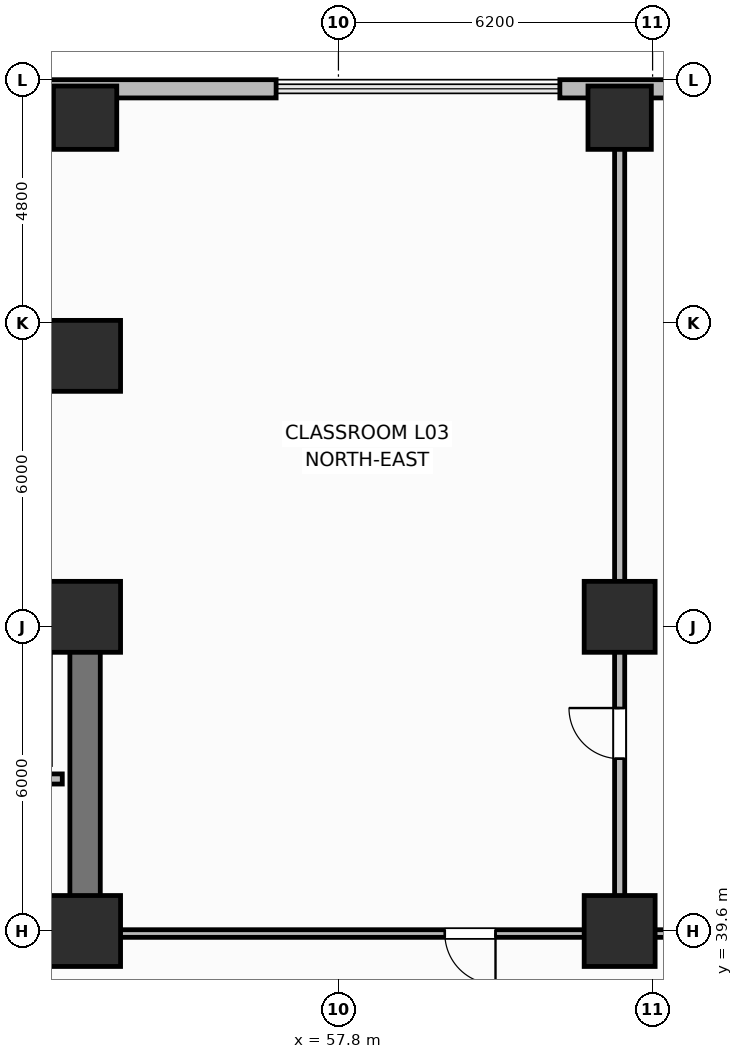
"""IFC4 building model, lengths in metres.
Left out: names, types, materials, properties, quantities, classifications, styles, units other than length and angle.
Written with IfcOpenShell. Run it as: python <this file> out.ifc"""

import sys

from ifc_helpers import new_model, si_unit, direction, frame, frame_2d, origin, origin_2d, place, context, subcontext, project, spatial, rectangle, extrude, element, fill, save


model = new_model("IFC4")
c1 = context("Model", 3, precision=1e-05, world=origin(), true_north=direction((0.0, 1.0)))
c2 = subcontext(c1, "Body", "Model", "MODEL_VIEW")
j1 = project(units=[si_unit("LENGTHUNIT", "METRE"), si_unit("PLANEANGLEUNIT", "RADIAN")], contexts=[c1])
p1 = place(None, origin())
s1 = spatial("IfcSite", under=j1, at=p1, CompositionType="ELEMENT")
p2 = place(p1, origin())
s2 = spatial("IfcBuilding", under=s1, at=p2, CompositionType="ELEMENT")
p3 = place(p2, frame((0.0, 0.0, 15.6)))
s3 = spatial("IfcBuildingStorey", under=s2, at=p3, CompositionType="ELEMENT", Elevation=15.6)
p4 = place(p3, frame((25.6, 45.8, 0.0), z_axis=(0.0, 0.0, 1.0), x_axis=(1.0, 0.0, 0.0)))
e1 = element("IfcWall", 1, at=p4, inside=s3, PredefinedType="SHEAR", context=c2, shape_type="SweptSolid", body=[
    extrude(rectangle(XDim=27.2, YDim=0.6, at=frame_2d((13.6, 0.0))), origin(), (0.0, 0.0, 1.0), 4.5),
])
p5 = place(p3, frame((52.8, 39.9, 0.0), z_axis=(0.0, 0.0, 1.0), x_axis=(0.0, 1.0, 0.0)))
e2 = element("IfcWall", 2, at=p5, inside=s3, PredefinedType="SHEAR", context=c2, shape_type="SweptSolid", body=[
    extrude(rectangle(XDim=5.6, YDim=0.6, at=frame_2d((2.8, 0.0))), origin(), (0.0, 0.0, 1.0), 4.5),
])
p6 = place(p3, frame((52.8, 39.6, 0.0), z_axis=(0.0, 0.0, 1.0), x_axis=(-1.0, 0.0, 0.0)))
e3 = element("IfcWall", 3, at=p6, inside=s3, PredefinedType="SHEAR", context=c2, shape_type="SweptSolid", body=[
    extrude(rectangle(XDim=27.2, YDim=0.6, at=frame_2d((13.6, 0.0))), origin(), (0.0, 0.0, 1.0), 4.5),
])
p7 = place(p6, frame((24.3, 0.0, 0.0)))
e4 = element("IfcOpeningElement", 4, at=p7, cuts=e3, PredefinedType="OPENING", context=c2, shape_type="SweptSolid", body=[
    extrude(rectangle(XDim=1.1, YDim=2.15, at=frame_2d((0.55, 1.075))), frame((0.0, 0.31, 0.0), z_axis=(0.0, -1.0, 0.0), x_axis=(1.0, 0.0, 0.0)), (0.0, 0.0, 1.0), 0.62),
])
p8 = place(p6, frame((21.85, 0.0, 0.0)))
e5 = element("IfcOpeningElement", 5, at=p8, cuts=e3, PredefinedType="OPENING", context=c2, shape_type="SweptSolid", body=[
    extrude(rectangle(XDim=0.85, YDim=2.1, at=frame_2d((0.425, 1.05))), frame((0.0, 0.31, 0.0), z_axis=(0.0, -1.0, 0.0), x_axis=(1.0, 0.0, 0.0)), (0.0, 0.0, 1.0), 0.62),
])
p9 = place(p6, frame((19.85, 0.0, 0.0)))
e6 = element("IfcOpeningElement", 6, at=p9, cuts=e3, PredefinedType="OPENING", context=c2, shape_type="SweptSolid", body=[
    extrude(rectangle(XDim=0.85, YDim=2.1, at=frame_2d((0.425, 1.05))), frame((0.0, 0.31, 0.0), z_axis=(0.0, -1.0, 0.0), x_axis=(1.0, 0.0, 0.0)), (0.0, 0.0, 1.0), 0.62),
])
p10 = place(p6, frame((15.1, 0.0, 0.0)))
e7 = element("IfcOpeningElement", 7, at=p10, cuts=e3, PredefinedType="OPENING", context=c2, shape_type="SweptSolid", body=[
    extrude(rectangle(XDim=1.2, YDim=2.15, at=frame_2d((0.6, 1.075))), frame((0.0, 0.31, 0.0), z_axis=(0.0, -1.0, 0.0), x_axis=(1.0, 0.0, 0.0)), (0.0, 0.0, 1.0), 0.62),
])
p11 = place(p6, frame((12.6, 0.0, 0.0)))
e8 = element("IfcOpeningElement", 8, at=p11, cuts=e3, PredefinedType="OPENING", context=c2, shape_type="SweptSolid", body=[
    extrude(rectangle(XDim=0.85, YDim=2.1, at=frame_2d((0.425, 1.05))), frame((0.0, 0.31, 0.0), z_axis=(0.0, -1.0, 0.0), x_axis=(1.0, 0.0, 0.0)), (0.0, 0.0, 1.0), 0.62),
])
p12 = place(p6, frame((10.85, 0.0, 0.0)))
e9 = element("IfcOpeningElement", 9, at=p12, cuts=e3, PredefinedType="OPENING", context=c2, shape_type="SweptSolid", body=[
    extrude(rectangle(XDim=0.85, YDim=2.1, at=frame_2d((0.425, 1.05))), frame((0.0, 0.31, 0.0), z_axis=(0.0, -1.0, 0.0), x_axis=(1.0, 0.0, 0.0)), (0.0, 0.0, 1.0), 0.62),
])
p13 = place(p6, frame((6.85, 0.0, 0.0)))
e10 = element("IfcOpeningElement", 10, at=p13, cuts=e3, PredefinedType="OPENING", context=c2, shape_type="SweptSolid", body=[
    extrude(rectangle(XDim=0.85, YDim=2.1, at=frame_2d((0.425, 1.05))), frame((0.0, 0.31, 0.0), z_axis=(0.0, -1.0, 0.0), x_axis=(1.0, 0.0, 0.0)), (0.0, 0.0, 1.0), 0.62),
])
p14 = place(p6, frame((2.0, 0.0, 0.0)))
e11 = element("IfcOpeningElement", 11, at=p14, cuts=e3, PredefinedType="OPENING", context=c2, shape_type="SweptSolid", body=[
    extrude(rectangle(XDim=0.85, YDim=2.1, at=frame_2d((0.425, 1.05))), frame((0.0, 0.31, 0.0), z_axis=(0.0, -1.0, 0.0), x_axis=(1.0, 0.0, 0.0)), (0.0, 0.0, 1.0), 0.62),
])
for number, where, z_axis, x_axis in (
    (12, (52.8, 39.6, 0.0), (0.0, 0.0, 1.0), (1.0, 0.0, 0.0)),
    (13, (52.8, 45.8, 0.0), (0.0, 0.0, 1.0), (1.0, 0.0, 0.0)),
):
    element("IfcColumn", number, at=place(p3, frame(where, z_axis=z_axis, x_axis=x_axis)), inside=s3, PredefinedType="COLUMN", context=c2, shape_type="SweptSolid", body=[
        extrude(rectangle(XDim=1.4, YDim=1.4, at=origin_2d()), origin(), (0.0, 0.0, 1.0), 4.5),
    ])
for number, where, z_axis, x_axis in (
    (14, (52.8, 55.65, 0.0), (0.0, 0.0, 1.0), (1.0, 0.0, 0.0)),
    (15, (63.35, 55.65, 0.0), (0.0, 0.0, 1.0), (1.0, 0.0, 0.0)),
):
    element("IfcColumn", number, at=place(p3, frame(where, z_axis=z_axis, x_axis=x_axis)), inside=s3, PredefinedType="COLUMN", context=c2, shape_type="SweptSolid", body=[
        extrude(rectangle(XDim=1.25, YDim=1.25, at=origin_2d()), origin(), (0.0, 0.0, 1.0), 4.5),
    ])
for number, where, z_axis, x_axis in (
    (16, (52.8, 50.95, 0.0), (0.0, 0.0, 1.0), (1.0, 0.0, 0.0)),
    (17, (63.35, 39.6, 0.0), (0.0, 0.0, 1.0), (1.0, 0.0, 0.0)),
    (18, (63.35, 45.8, 0.0), (0.0, 0.0, 1.0), (1.0, 0.0, 0.0)),
):
    element("IfcColumn", number, at=place(p3, frame(where, z_axis=z_axis, x_axis=x_axis)), inside=s3, PredefinedType="COLUMN", context=c2, shape_type="SweptSolid", body=[
        extrude(rectangle(XDim=1.4, YDim=1.4, at=origin_2d()), origin(), (0.0, 0.0, 1.0), 4.5),
    ])
p15 = place(p3, frame((77.42, 56.22, 0.0), z_axis=(0.0, 0.0, 1.0), x_axis=(-1.0, 0.0, 0.0)))
e19 = element("IfcWall", 19, at=p15, inside=s3, PredefinedType="SOLIDWALL", context=c2, shape_type="SweptSolid", body=[
    extrude(rectangle(XDim=15.25, YDim=0.36, at=frame_2d((7.625, 0.0))), origin(), (0.0, 0.0, 1.0), 3.48),
])
p16 = place(p15, frame((1.775, 0.0, 0.85)))
e20 = element("IfcOpeningElement", 20, at=p16, cuts=e19, PredefinedType="OPENING", context=c2, shape_type="SweptSolid", body=[
    extrude(rectangle(XDim=2.4, YDim=2.25, at=frame_2d((1.2, 1.125))), frame((0.0, 0.19, 0.0), z_axis=(0.0, -1.0, 0.0), x_axis=(1.0, 0.0, 0.0)), (0.0, 0.0, 1.0), 0.38),
])
p17 = place(p15, frame((7.475, 0.0, 0.85)))
e21 = element("IfcOpeningElement", 21, at=p17, cuts=e19, PredefinedType="OPENING", context=c2, shape_type="SweptSolid", body=[
    extrude(rectangle(XDim=2.4, YDim=2.25, at=frame_2d((1.2, 1.125))), frame((0.0, 0.19, 0.0), z_axis=(0.0, -1.0, 0.0), x_axis=(1.0, 0.0, 0.0)), (0.0, 0.0, 1.0), 0.38),
])
p18 = place(p15, frame((10.375, 0.0, 0.85)))
e22 = element("IfcOpeningElement", 22, at=p18, cuts=e19, PredefinedType="OPENING", context=c2, shape_type="SweptSolid", body=[
    extrude(rectangle(XDim=2.4, YDim=2.25, at=frame_2d((1.2, 1.125))), frame((0.0, 0.19, 0.0), z_axis=(0.0, -1.0, 0.0), x_axis=(1.0, 0.0, 0.0)), (0.0, 0.0, 1.0), 0.38),
])
p19 = place(p3, frame((56.57, 56.22, 0.0), z_axis=(0.0, 0.0, 1.0), x_axis=(-1.0, 0.0, 0.0)))
e23 = element("IfcWall", 23, at=p19, inside=s3, PredefinedType="SOLIDWALL", context=c2, shape_type="SweptSolid", body=[
    extrude(rectangle(XDim=55.59, YDim=0.36, at=frame_2d((27.795, 0.0))), origin(), (0.0, 0.0, 1.0), 3.48),
])
p20 = place(p19, frame((5.267, 0.0, 0.85)))
e24 = element("IfcOpeningElement", 24, at=p20, cuts=e23, PredefinedType="OPENING", context=c2, shape_type="SweptSolid", body=[
    extrude(rectangle(XDim=2.4, YDim=2.25, at=frame_2d((1.2, 1.125))), frame((0.0, 0.19, 0.0), z_axis=(0.0, -1.0, 0.0), x_axis=(1.0, 0.0, 0.0)), (0.0, 0.0, 1.0), 0.38),
])
p21 = place(p19, frame((9.145, 0.0, 0.85)))
e25 = element("IfcOpeningElement", 25, at=p21, cuts=e23, PredefinedType="OPENING", context=c2, shape_type="SweptSolid", body=[
    extrude(rectangle(XDim=2.4, YDim=2.25, at=frame_2d((1.2, 1.125))), frame((0.0, 0.19, 0.0), z_axis=(0.0, -1.0, 0.0), x_axis=(1.0, 0.0, 0.0)), (0.0, 0.0, 1.0), 0.38),
])
p22 = place(p19, frame((13.022, 0.0, 0.85)))
e26 = element("IfcOpeningElement", 26, at=p22, cuts=e23, PredefinedType="OPENING", context=c2, shape_type="SweptSolid", body=[
    extrude(rectangle(XDim=2.4, YDim=2.25, at=frame_2d((1.2, 1.125))), frame((0.0, 0.19, 0.0), z_axis=(0.0, -1.0, 0.0), x_axis=(1.0, 0.0, 0.0)), (0.0, 0.0, 1.0), 0.38),
])
p23 = place(p19, frame((20.778, 0.0, 0.85)))
e27 = element("IfcOpeningElement", 27, at=p23, cuts=e23, PredefinedType="OPENING", context=c2, shape_type="SweptSolid", body=[
    extrude(rectangle(XDim=2.4, YDim=2.25, at=frame_2d((1.2, 1.125))), frame((0.0, 0.19, 0.0), z_axis=(0.0, -1.0, 0.0), x_axis=(1.0, 0.0, 0.0)), (0.0, 0.0, 1.0), 0.38),
])
p24 = place(p19, frame((24.656, 0.0, 0.85)))
e28 = element("IfcOpeningElement", 28, at=p24, cuts=e23, PredefinedType="OPENING", context=c2, shape_type="SweptSolid", body=[
    extrude(rectangle(XDim=2.4, YDim=2.25, at=frame_2d((1.2, 1.125))), frame((0.0, 0.19, 0.0), z_axis=(0.0, -1.0, 0.0), x_axis=(1.0, 0.0, 0.0)), (0.0, 0.0, 1.0), 0.38),
])
p25 = place(p19, frame((32.412, 0.0, 0.85)))
e29 = element("IfcOpeningElement", 29, at=p25, cuts=e23, PredefinedType="OPENING", context=c2, shape_type="SweptSolid", body=[
    extrude(rectangle(XDim=2.4, YDim=2.25, at=frame_2d((1.2, 1.125))), frame((0.0, 0.19, 0.0), z_axis=(0.0, -1.0, 0.0), x_axis=(1.0, 0.0, 0.0)), (0.0, 0.0, 1.0), 0.38),
])
p26 = place(p19, frame((36.29, 0.0, 0.85)))
e30 = element("IfcOpeningElement", 30, at=p26, cuts=e23, PredefinedType="OPENING", context=c2, shape_type="SweptSolid", body=[
    extrude(rectangle(XDim=2.4, YDim=2.25, at=frame_2d((1.2, 1.125))), frame((0.0, 0.19, 0.0), z_axis=(0.0, -1.0, 0.0), x_axis=(1.0, 0.0, 0.0)), (0.0, 0.0, 1.0), 0.38),
])
p27 = place(p19, frame((44.045, 0.0, 0.85)))
e31 = element("IfcOpeningElement", 31, at=p27, cuts=e23, PredefinedType="OPENING", context=c2, shape_type="SweptSolid", body=[
    extrude(rectangle(XDim=2.4, YDim=2.25, at=frame_2d((1.2, 1.125))), frame((0.0, 0.19, 0.0), z_axis=(0.0, -1.0, 0.0), x_axis=(1.0, 0.0, 0.0)), (0.0, 0.0, 1.0), 0.38),
])
p28 = place(p19, frame((51.801, 0.0, 0.85)))
e32 = element("IfcOpeningElement", 32, at=p28, cuts=e23, PredefinedType="OPENING", context=c2, shape_type="SweptSolid", body=[
    extrude(rectangle(XDim=2.4, YDim=2.25, at=frame_2d((1.2, 1.125))), frame((0.0, 0.19, 0.0), z_axis=(0.0, -1.0, 0.0), x_axis=(1.0, 0.0, 0.0)), (0.0, 0.0, 1.0), 0.38),
])
p29 = place(p3, frame((52.35, 42.6, 0.0), z_axis=(0.0, 0.0, 1.0), x_axis=(-1.0, 0.0, 0.0)))
e33 = element("IfcWall", 33, at=p29, inside=s3, PredefinedType="PARTITIONING", context=c2, shape_type="SweptSolid", body=[
    extrude(rectangle(XDim=8.8, YDim=0.2, at=frame_2d((4.4, 0.0))), origin(), (0.0, 0.0, 1.0), 3.42),
])
p30 = place(p3, frame((63.35, 39.6, 0.0), z_axis=(0.0, 0.0, 1.0), x_axis=(0.0, 1.0, 0.0)))
e34 = element("IfcWall", 34, at=p30, inside=s3, PredefinedType="PARTITIONING", context=c2, shape_type="SweptSolid", body=[
    extrude(rectangle(XDim=16.4, YDim=0.2, at=frame_2d((8.2, 0.0))), origin(), (0.0, 0.0, 1.0), 3.42),
])
p31 = place(p30, frame((3.4, 0.0, 0.0)))
e35 = element("IfcOpeningElement", 35, at=p31, cuts=e34, PredefinedType="OPENING", context=c2, shape_type="SweptSolid", body=[
    extrude(rectangle(XDim=1.0, YDim=2.15, at=frame_2d((0.5, 1.075))), frame((0.0, 0.11, 0.0), z_axis=(0.0, -1.0, 0.0), x_axis=(1.0, 0.0, 0.0)), (0.0, 0.0, 1.0), 0.22),
])
p32 = place(p3, frame((66.4, 39.55, 0.0), z_axis=(0.0, 0.0, 1.0), x_axis=(-1.0, 0.0, 0.0)))
e36 = element("IfcWall", 36, at=p32, inside=s3, PredefinedType="PARTITIONING", context=c2, shape_type="SweptSolid", body=[
    extrude(rectangle(XDim=13.25, YDim=0.15, at=frame_2d((6.625, 0.0))), origin(), (0.0, 0.0, 1.0), 3.42),
])
p33 = place(p32, frame((5.5, 0.0, 0.0)))
e37 = element("IfcOpeningElement", 37, at=p33, cuts=e36, PredefinedType="OPENING", context=c2, shape_type="SweptSolid", body=[
    extrude(rectangle(XDim=1.0, YDim=2.15, at=frame_2d((0.5, 1.075))), frame((0.0, 0.085, 0.0), z_axis=(0.0, -1.0, 0.0), x_axis=(1.0, 0.0, 0.0)), (0.0, 0.0, 1.0), 0.17),
])
p34 = place(p31, origin())
e38 = element("IfcDoor", 38, at=p34, inside=s3, OperationType="SINGLE_SWING_RIGHT", PredefinedType="DOOR", context=c2, shape_type="SweptSolid", body=[
    extrude(rectangle(XDim=1.0, YDim=2.15, at=frame_2d((0.5, 1.075))), frame((0.0, 0.025, 0.0), z_axis=(0.0, -1.0, 0.0), x_axis=(1.0, 0.0, 0.0)), (0.0, 0.0, 1.0), 0.05),
])
fill(e35, e38)
p35 = place(p33, origin())
e39 = element("IfcDoor", 39, at=p35, inside=s3, OperationType="SINGLE_SWING_LEFT", PredefinedType="DOOR", context=c2, shape_type="SweptSolid", body=[
    extrude(rectangle(XDim=1.0, YDim=2.15, at=frame_2d((0.5, 1.075))), frame((0.0, 0.025, 0.0), z_axis=(0.0, -1.0, 0.0), x_axis=(1.0, 0.0, 0.0)), (0.0, 0.0, 1.0), 0.05),
])
fill(e37, e39)
save(model, sys.argv[1])
